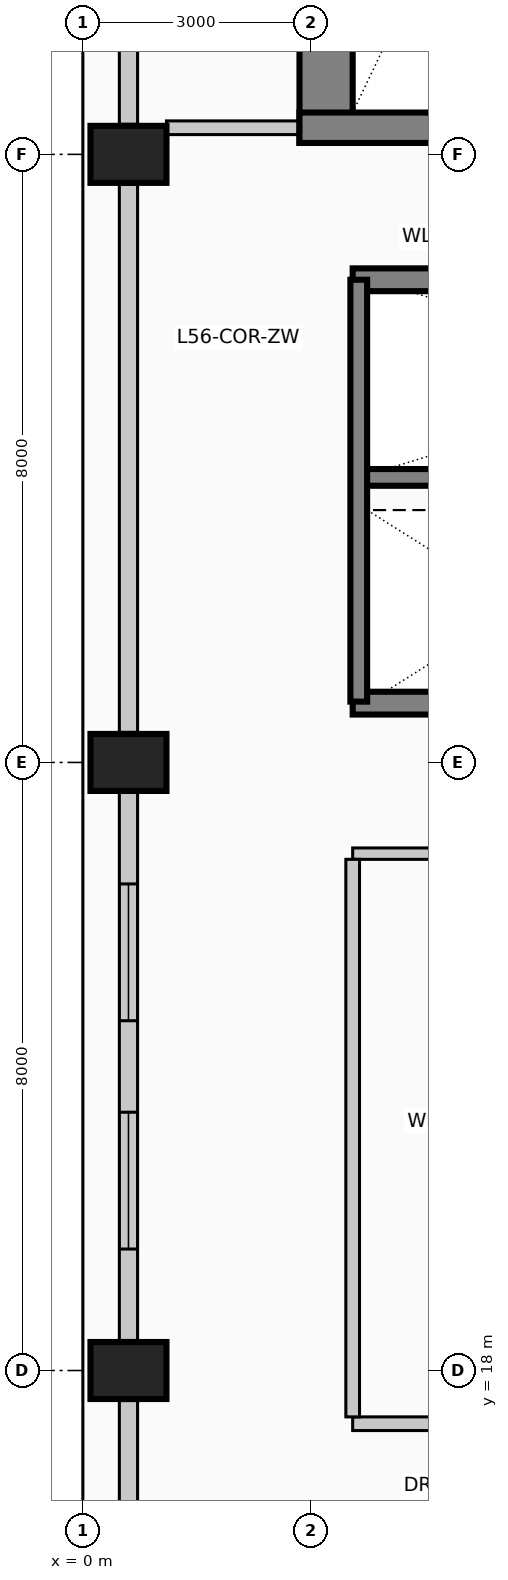
"""IFC4 building model, lengths in metres.
Left out: names, types, materials, properties, quantities, classifications, styles, units other than length and angle.
Written with IfcOpenShell. Run it as: python <this file> out.ifc"""

import sys

from ifc_helpers import new_model, si_unit, direction, frame, frame_2d, origin, origin_2d, place, context, subcontext, project, spatial, rectangle, extrude, element, fill, save


model = new_model("IFC4")
c1 = context("Model", 3, precision=1e-05, world=origin(), true_north=direction((0.0, 1.0)))
c2 = subcontext(c1, "Body", "Model", "MODEL_VIEW")
j1 = project(units=[si_unit("LENGTHUNIT", "METRE"), si_unit("PLANEANGLEUNIT", "RADIAN")], contexts=[c1])
p1 = place(None, origin())
s1 = spatial("IfcSite", under=j1, at=p1, CompositionType="ELEMENT")
p2 = place(p1, origin())
s2 = spatial("IfcBuilding", under=s1, at=p2, CompositionType="ELEMENT")
p3 = place(p2, frame((0.0, 0.0, 230.6)))
s3 = spatial("IfcBuildingStorey", under=s2, at=p3, CompositionType="ELEMENT", Elevation=230.6)
p4 = place(p3, frame((3.2, 34.15, 0.0), z_axis=(0.0, 0.0, 1.0), x_axis=(0.0, 1.0, 0.0)))
e1 = element("IfcWall", 1, at=p4, inside=s3, PredefinedType="SHEAR", context=c2, shape_type="SweptSolid", body=[
    extrude(rectangle(XDim=8.98, YDim=0.7, at=frame_2d((4.49, 0.0))), origin(), (0.0, 0.0, 1.0), 4.0),
])
p5 = place(p3, frame((2.85, 34.35, 0.0), z_axis=(0.0, 0.0, 1.0), x_axis=(1.0, 0.0, 0.0)))
e2 = element("IfcWall", 2, at=p5, inside=s3, PredefinedType="SHEAR", context=c2, shape_type="SweptSolid", body=[
    extrude(rectangle(XDim=4.86, YDim=0.4, at=frame_2d((2.43, 0.0))), origin(), (0.0, 0.0, 1.0), 4.0),
])
p6 = place(p5, frame((2.4, 0.0, 0.0)))
e3 = element("IfcOpeningElement", 3, at=p6, cuts=e2, PredefinedType="OPENING", context=c2, shape_type="SweptSolid", body=[
    extrude(rectangle(XDim=1.15, YDim=2.2, at=frame_2d((0.575, 1.1))), frame((0.0, 0.21, 0.0), z_axis=(0.0, -1.0, 0.0), x_axis=(1.0, 0.0, 0.0)), (0.0, 0.0, 1.0), 0.42),
])
for number, where, z_axis, x_axis in (
    (4, (0.6, 18.0, 0.0), (0.0, 0.0, 1.0), (0.0, 1.0, 0.0)),
    (5, (0.6, 26.0, 0.0), (0.0, 0.0, 1.0), (0.0, 1.0, 0.0)),
    (6, (0.6, 34.0, 0.0), (0.0, 0.0, 1.0), (0.0, 1.0, 0.0)),
):
    element("IfcColumn", number, at=place(p3, frame(where, z_axis=z_axis, x_axis=x_axis)), inside=s3, PredefinedType="COLUMN", context=c2, shape_type="SweptSolid", body=[
        extrude(rectangle(XDim=0.75, YDim=1.0, at=origin_2d()), origin(), (0.0, 0.0, 1.0), 4.0),
    ])
p7 = place(p3, frame((0.6, 10.395, 0.0), z_axis=(0.0, 0.0, 1.0), x_axis=(0.0, 1.0, 0.0)))
e7 = element("IfcWall", 7, at=p7, inside=s3, PredefinedType="SOLIDWALL", context=c2, shape_type="SweptSolid", body=[
    extrude(rectangle(XDim=7.21, YDim=0.24, at=frame_2d((3.605, 0.0))), origin(), (0.0, 0.0, 1.0), 3.0),
])
p8 = place(p7, frame((1.203, 0.0, 0.42)))
e8 = element("IfcOpeningElement", 8, at=p8, cuts=e7, PredefinedType="OPENING", context=c2, shape_type="SweptSolid", body=[
    extrude(rectangle(XDim=1.8, YDim=2.2, at=frame_2d((0.9, 1.1))), frame((0.0, 0.13, 0.0), z_axis=(0.0, -1.0, 0.0), x_axis=(1.0, 0.0, 0.0)), (0.0, 0.0, 1.0), 0.26),
])
p9 = place(p3, frame((0.6, 18.395, 0.0), z_axis=(0.0, 0.0, 1.0), x_axis=(0.0, 1.0, 0.0)))
e9 = element("IfcWall", 9, at=p9, inside=s3, PredefinedType="SOLIDWALL", context=c2, shape_type="SweptSolid", body=[
    extrude(rectangle(XDim=7.21, YDim=0.24, at=frame_2d((3.605, 0.0))), origin(), (0.0, 0.0, 1.0), 3.0),
])
p10 = place(p9, frame((1.203, 0.0, 0.42)))
e10 = element("IfcOpeningElement", 10, at=p10, cuts=e9, PredefinedType="OPENING", context=c2, shape_type="SweptSolid", body=[
    extrude(rectangle(XDim=1.8, YDim=2.2, at=frame_2d((0.9, 1.1))), frame((0.0, 0.13, 0.0), z_axis=(0.0, -1.0, 0.0), x_axis=(1.0, 0.0, 0.0)), (0.0, 0.0, 1.0), 0.26),
])
p11 = place(p9, frame((4.207, 0.0, 0.42)))
e11 = element("IfcOpeningElement", 11, at=p11, cuts=e9, PredefinedType="OPENING", context=c2, shape_type="SweptSolid", body=[
    extrude(rectangle(XDim=1.8, YDim=2.2, at=frame_2d((0.9, 1.1))), frame((0.0, 0.13, 0.0), z_axis=(0.0, -1.0, 0.0), x_axis=(1.0, 0.0, 0.0)), (0.0, 0.0, 1.0), 0.26),
])
p12 = place(p3, frame((0.6, 26.395, 0.0), z_axis=(0.0, 0.0, 1.0), x_axis=(0.0, 1.0, 0.0)))
e12 = element("IfcWall", 12, at=p12, inside=s3, PredefinedType="SOLIDWALL", context=c2, shape_type="SweptSolid", body=[
    extrude(rectangle(XDim=7.21, YDim=0.24, at=frame_2d((3.605, 0.0))), origin(), (0.0, 0.0, 1.0), 3.0),
])
p13 = place(p3, frame((0.6, 34.395, 0.0), z_axis=(0.0, 0.0, 1.0), x_axis=(0.0, 1.0, 0.0)))
e13 = element("IfcWall", 13, at=p13, inside=s3, PredefinedType="SOLIDWALL", context=c2, shape_type="SweptSolid", body=[
    extrude(rectangle(XDim=7.61, YDim=0.24, at=frame_2d((3.805, 0.0))), origin(), (0.0, 0.0, 1.0), 3.0),
])
for number, where, z_axis, x_axis in (
    (14, (3.55, 32.35, 0.0), (0.0, 0.0, 1.0), (1.0, 0.0, 0.0)),
    (15, (5.65, 26.78, 0.0), (0.0, 0.0, 1.0), (-1.0, 0.0, 0.0)),
):
    element("IfcWall", number, at=place(p3, frame(where, z_axis=z_axis, x_axis=x_axis)), inside=s3, PredefinedType="SOLIDWALL", context=c2, shape_type="SweptSolid", body=[
        extrude(rectangle(XDim=2.1, YDim=0.3, at=frame_2d((1.05, 0.0))), origin(), (0.0, 0.0, 1.0), 4.0),
    ])
p14 = place(p3, frame((3.55, 29.75, 0.0), z_axis=(0.0, 0.0, 1.0), x_axis=(1.0, 0.0, 0.0)))
e16 = element("IfcWall", 16, at=p14, inside=s3, PredefinedType="SOLIDWALL", context=c2, shape_type="SweptSolid", body=[
    extrude(rectangle(XDim=8.65, YDim=0.22, at=frame_2d((4.325, 0.0))), origin(), (0.0, 0.0, 1.0), 4.0),
])
p15 = place(p3, frame((3.63, 26.8, 0.0), z_axis=(0.0, 0.0, 1.0), x_axis=(0.0, 1.0, 0.0)))
e17 = element("IfcWall", 17, at=p15, inside=s3, PredefinedType="SOLIDWALL", context=c2, shape_type="SweptSolid", body=[
    extrude(rectangle(XDim=5.55, YDim=0.22, at=frame_2d((2.775, 0.0))), origin(), (0.0, 0.0, 1.0), 4.0),
])
p16 = place(p3, frame((3.55, 17.3, 0.0), z_axis=(0.0, 0.0, 1.0), x_axis=(1.0, 0.0, 0.0)))
e18 = element("IfcWall", 18, at=p16, inside=s3, PredefinedType="PARTITIONING", context=c2, shape_type="SweptSolid", body=[
    extrude(rectangle(XDim=6.25, YDim=0.18, at=frame_2d((3.125, 0.0))), origin(), (0.0, 0.0, 1.0), 3.75),
])
p17 = place(p16, frame((2.65, 0.0, 0.0)))
e19 = element("IfcOpeningElement", 19, at=p17, cuts=e18, PredefinedType="OPENING", context=c2, shape_type="SweptSolid", body=[
    extrude(rectangle(XDim=0.95, YDim=2.15, at=frame_2d((0.475, 1.075))), frame((0.0, 0.1, 0.0), z_axis=(0.0, -1.0, 0.0), x_axis=(1.0, 0.0, 0.0)), (0.0, 0.0, 1.0), 0.2),
])
p18 = place(p3, frame((3.55, 24.8, 0.0), z_axis=(0.0, 0.0, 1.0), x_axis=(1.0, 0.0, 0.0)))
e20 = element("IfcWall", 20, at=p18, inside=s3, PredefinedType="PARTITIONING", context=c2, shape_type="SweptSolid", body=[
    extrude(rectangle(XDim=6.25, YDim=0.15, at=frame_2d((3.125, 0.0))), origin(), (0.0, 0.0, 1.0), 3.75),
])
p19 = place(p3, frame((1.1, 34.35, 0.0), z_axis=(0.0, 0.0, 1.0), x_axis=(1.0, 0.0, 0.0)))
e21 = element("IfcWall", 21, at=p19, inside=s3, PredefinedType="PARTITIONING", context=c2, shape_type="SweptSolid", body=[
    extrude(rectangle(XDim=1.75, YDim=0.18, at=frame_2d((0.875, 0.0))), origin(), (0.0, 0.0, 1.0), 3.75),
])
p20 = place(p3, frame((3.55, 17.39, 0.0), z_axis=(0.0, 0.0, 1.0), x_axis=(0.0, 1.0, 0.0)))
e22 = element("IfcWall", 22, at=p20, inside=s3, PredefinedType="PARTITIONING", context=c2, shape_type="SweptSolid", body=[
    extrude(rectangle(XDim=7.335, YDim=0.18, at=frame_2d((3.667, 0.0))), origin(), (0.0, 0.0, 1.0), 3.75),
])
p21 = place(p10, origin())
e23 = element("IfcWindow", 23, at=p21, inside=s3, PartitioningType="SINGLE_PANEL", PredefinedType="WINDOW", context=c2, shape_type="SweptSolid", body=[
    extrude(rectangle(XDim=1.8, YDim=2.2, at=frame_2d((0.9, 1.1))), frame((0.0, 0.03, 0.0), z_axis=(0.0, -1.0, 0.0), x_axis=(1.0, 0.0, 0.0)), (0.0, 0.0, 1.0), 0.06),
])
fill(e10, e23)
p22 = place(p11, origin())
e24 = element("IfcWindow", 24, at=p22, inside=s3, PartitioningType="SINGLE_PANEL", PredefinedType="WINDOW", context=c2, shape_type="SweptSolid", body=[
    extrude(rectangle(XDim=1.8, YDim=2.2, at=frame_2d((0.9, 1.1))), frame((0.0, 0.03, 0.0), z_axis=(0.0, -1.0, 0.0), x_axis=(1.0, 0.0, 0.0)), (0.0, 0.0, 1.0), 0.06),
])
fill(e11, e24)
save(model, sys.argv[1])
